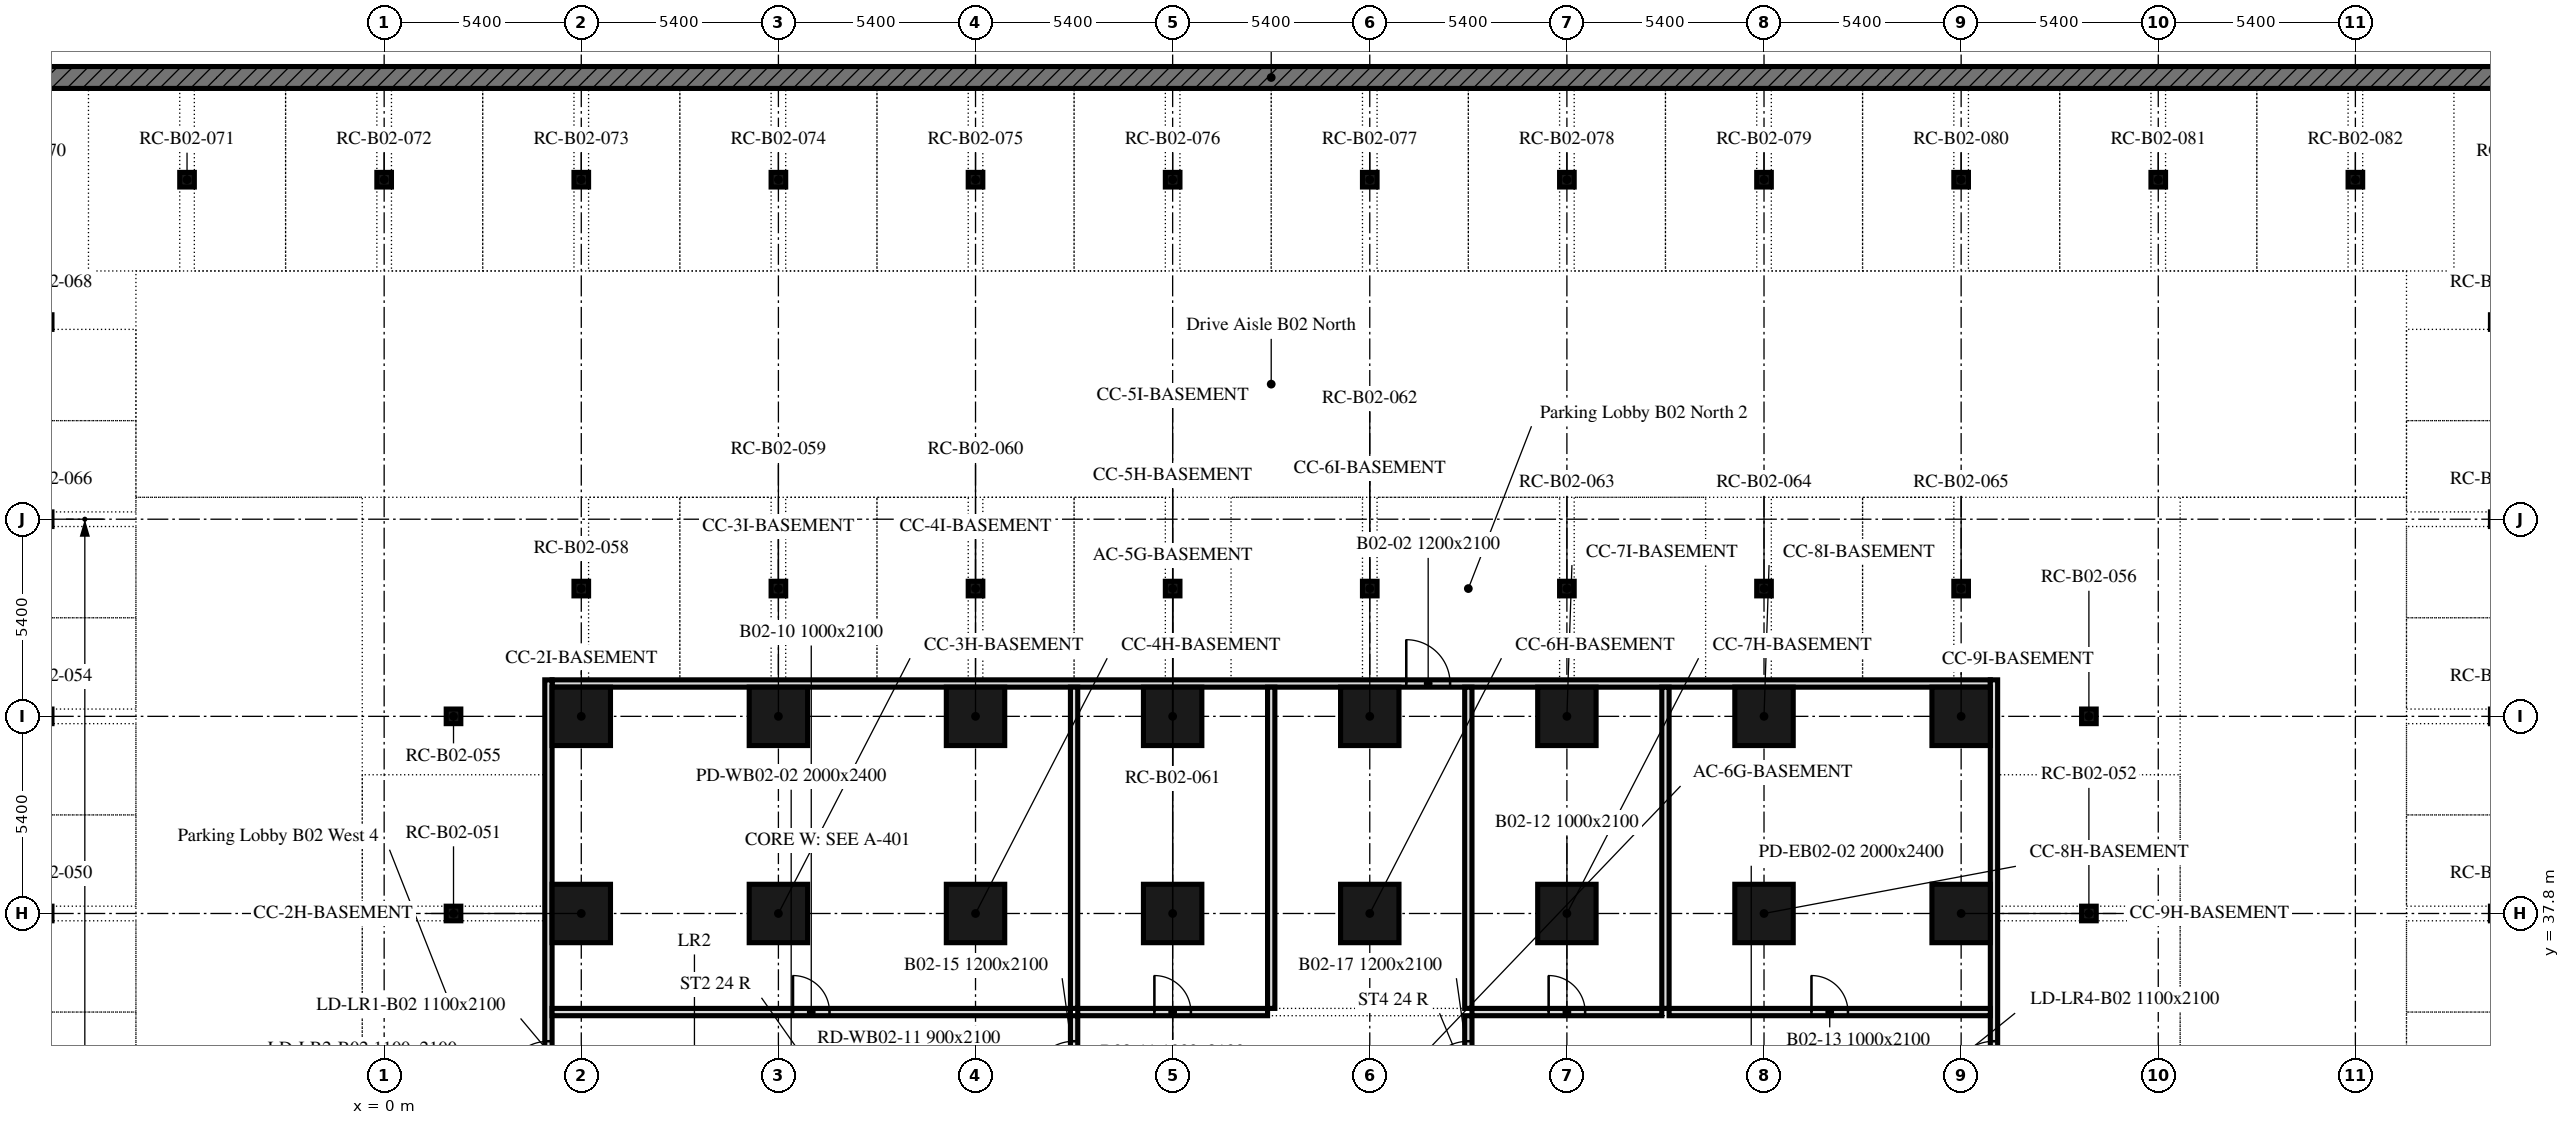
"""IFC4 building model, lengths in metres.
Left out: names, types, materials, properties, quantities, classifications, styles, units other than length and angle.
Written with IfcOpenShell. Run it as: python <this file> out.ifc"""

import sys

from ifc_helpers import new_model, si_unit, direction, frame, frame_2d, origin, origin_2d, place, context, subcontext, project, spatial, rectangle, extrude, element, fill, save


model = new_model("IFC4")
c1 = context("Model", 3, precision=1e-05, world=origin(), true_north=direction((0.0, 1.0)))
c2 = subcontext(c1, "Body", "Model", "MODEL_VIEW")
j1 = project(units=[si_unit("LENGTHUNIT", "METRE"), si_unit("PLANEANGLEUNIT", "RADIAN")], contexts=[c1])
p1 = place(None, origin())
s1 = spatial("IfcSite", under=j1, at=p1, CompositionType="ELEMENT")
p2 = place(p1, origin())
s2 = spatial("IfcBuilding", under=s1, at=p2, CompositionType="ELEMENT")
p3 = place(p2, frame((0.0, 0.0, -9.0)))
s3 = spatial("IfcBuildingStorey", under=s2, at=p3, CompositionType="ELEMENT", Elevation=-9.0)
p4 = place(p3, frame((-11.8, 60.7, 0.0), z_axis=(0.0, 0.0, 1.0), x_axis=(1.0, 0.0, 0.0)))
e1 = element("IfcWall", 1, at=p4, inside=s3, PredefinedType="SOLIDWALL", context=c2, shape_type="SweptSolid", body=[
    extrude(rectangle(XDim=72.2, YDim=0.6, at=frame_2d((36.1, 0.0))), origin(), (0.0, 0.0, 1.0), 4.1),
])
for number, where, z_axis, x_axis in (
    (2, (5.4, 37.8, 0.0), (0.0, 0.0, 1.0), (1.0, 0.0, 0.0)),
    (3, (10.8, 37.8, 0.0), (0.0, 0.0, 1.0), (1.0, 0.0, 0.0)),
    (4, (16.2, 37.8, 0.0), (0.0, 0.0, 1.0), (1.0, 0.0, 0.0)),
    (5, (21.6, 37.8, 0.0), (0.0, 0.0, 1.0), (1.0, 0.0, 0.0)),
    (6, (27.0, 37.8, 0.0), (0.0, 0.0, 1.0), (1.0, 0.0, 0.0)),
    (7, (32.4, 37.8, 0.0), (0.0, 0.0, 1.0), (1.0, 0.0, 0.0)),
    (8, (37.8, 37.8, 0.0), (0.0, 0.0, 1.0), (1.0, 0.0, 0.0)),
    (9, (43.2, 37.8, 0.0), (0.0, 0.0, 1.0), (1.0, 0.0, 0.0)),
    (10, (5.4, 43.2, 0.0), (0.0, 0.0, 1.0), (1.0, 0.0, 0.0)),
    (11, (10.8, 43.2, 0.0), (0.0, 0.0, 1.0), (1.0, 0.0, 0.0)),
    (12, (16.2, 43.2, 0.0), (0.0, 0.0, 1.0), (1.0, 0.0, 0.0)),
    (13, (21.6, 43.2, 0.0), (0.0, 0.0, 1.0), (1.0, 0.0, 0.0)),
    (14, (27.0, 43.2, 0.0), (0.0, 0.0, 1.0), (1.0, 0.0, 0.0)),
    (15, (32.4, 43.2, 0.0), (0.0, 0.0, 1.0), (1.0, 0.0, 0.0)),
    (16, (37.8, 43.2, 0.0), (0.0, 0.0, 1.0), (1.0, 0.0, 0.0)),
    (17, (43.2, 43.2, 0.0), (0.0, 0.0, 1.0), (1.0, 0.0, 0.0)),
):
    element("IfcColumn", number, at=place(p3, frame(where, z_axis=z_axis, x_axis=x_axis)), inside=s3, PredefinedType="COLUMN", context=c2, shape_type="SweptSolid", body=[
        extrude(rectangle(XDim=1.6, YDim=1.6, at=origin_2d()), origin(), (0.0, 0.0, 1.0), 4.1),
    ])
for number, where, z_axis, x_axis in (
    (18, (1.9, 37.8, 0.0), (0.0, 0.0, 1.0), (1.0, 0.0, 0.0)),
    (19, (46.7, 37.8, 0.0), (0.0, 0.0, 1.0), (1.0, 0.0, 0.0)),
    (20, (1.9, 43.2, 0.0), (0.0, 0.0, 1.0), (1.0, 0.0, 0.0)),
    (21, (46.7, 43.2, 0.0), (0.0, 0.0, 1.0), (1.0, 0.0, 0.0)),
    (22, (5.4, 46.7, 0.0), (0.0, 0.0, 1.0), (1.0, 0.0, 0.0)),
    (23, (10.8, 46.7, 0.0), (0.0, 0.0, 1.0), (1.0, 0.0, 0.0)),
    (24, (16.2, 46.7, 0.0), (0.0, 0.0, 1.0), (1.0, 0.0, 0.0)),
    (25, (21.6, 46.7, 0.0), (0.0, 0.0, 1.0), (1.0, 0.0, 0.0)),
    (26, (27.0, 46.7, 0.0), (0.0, 0.0, 1.0), (1.0, 0.0, 0.0)),
    (27, (32.4, 46.7, 0.0), (0.0, 0.0, 1.0), (1.0, 0.0, 0.0)),
    (28, (37.8, 46.7, 0.0), (0.0, 0.0, 1.0), (1.0, 0.0, 0.0)),
    (29, (43.2, 46.7, 0.0), (0.0, 0.0, 1.0), (1.0, 0.0, 0.0)),
    (30, (-5.4, 57.9, 0.0), (0.0, 0.0, 1.0), (1.0, 0.0, 0.0)),
    (31, (0.0, 57.9, 0.0), (0.0, 0.0, 1.0), (1.0, 0.0, 0.0)),
    (32, (5.4, 57.9, 0.0), (0.0, 0.0, 1.0), (1.0, 0.0, 0.0)),
    (33, (10.8, 57.9, 0.0), (0.0, 0.0, 1.0), (1.0, 0.0, 0.0)),
    (34, (16.2, 57.9, 0.0), (0.0, 0.0, 1.0), (1.0, 0.0, 0.0)),
    (35, (21.6, 57.9, 0.0), (0.0, 0.0, 1.0), (1.0, 0.0, 0.0)),
    (36, (27.0, 57.9, 0.0), (0.0, 0.0, 1.0), (1.0, 0.0, 0.0)),
    (37, (32.4, 57.9, 0.0), (0.0, 0.0, 1.0), (1.0, 0.0, 0.0)),
    (38, (37.8, 57.9, 0.0), (0.0, 0.0, 1.0), (1.0, 0.0, 0.0)),
    (39, (43.2, 57.9, 0.0), (0.0, 0.0, 1.0), (1.0, 0.0, 0.0)),
    (40, (48.6, 57.9, 0.0), (0.0, 0.0, 1.0), (1.0, 0.0, 0.0)),
    (41, (54.0, 57.9, 0.0), (0.0, 0.0, 1.0), (1.0, 0.0, 0.0)),
):
    element("IfcColumn", number, at=place(p3, frame(where, z_axis=z_axis, x_axis=x_axis)), inside=s3, PredefinedType="COLUMN", context=c2, shape_type="SweptSolid", body=[
        extrude(rectangle(XDim=0.4, YDim=0.4, at=origin_2d()), origin(), (0.0, 0.0, 1.0), 4.1),
    ])
p5 = place(p3, frame((4.6, 44.1, 0.0), z_axis=(0.0, 0.0, 1.0), x_axis=(1.0, 0.0, 0.0)))
e42 = element("IfcWall", 42, at=p5, inside=s3, PredefinedType="PARTITIONING", context=c2, shape_type="SweptSolid", body=[
    extrude(rectangle(XDim=39.4, YDim=0.2, at=frame_2d((19.7, 0.0))), origin(), (0.0, 0.0, 1.0), 4.1),
])
p6 = place(p5, frame((23.4, 0.0, 0.0)))
e43 = element("IfcOpeningElement", 43, at=p6, cuts=e42, PredefinedType="OPENING", context=c2, shape_type="SweptSolid", body=[
    extrude(rectangle(XDim=1.2, YDim=2.1, at=frame_2d((0.6, 1.05))), frame((0.0, 0.11, 0.0), z_axis=(0.0, -1.0, 0.0), x_axis=(1.0, 0.0, 0.0)), (0.0, 0.0, 1.0), 0.22),
])
p7 = place(p3, frame((4.5, 4.4, 0.0), z_axis=(0.0, 0.0, 1.0), x_axis=(0.0, 1.0, 0.0)))
e44 = element("IfcWall", 44, at=p7, inside=s3, PredefinedType="PARTITIONING", context=c2, shape_type="SweptSolid", body=[
    extrude(rectangle(XDim=39.8, YDim=0.2, at=frame_2d((19.9, 0.0))), origin(), (0.0, 0.0, 1.0), 4.1),
])
p8 = place(p7, frame((9.9, 0.0, 0.0)))
e45 = element("IfcOpeningElement", 45, at=p8, cuts=e44, PredefinedType="OPENING", context=c2, shape_type="SweptSolid", body=[
    extrude(rectangle(XDim=1.2, YDim=2.1, at=frame_2d((0.6, 1.05))), frame((0.0, 0.11, 0.0), z_axis=(0.0, -1.0, 0.0), x_axis=(1.0, 0.0, 0.0)), (0.0, 0.0, 1.0), 0.22),
])
p9 = place(p7, frame((28.7, 0.0, 0.0)))
e46 = element("IfcOpeningElement", 46, at=p9, cuts=e44, PredefinedType="OPENING", context=c2, shape_type="SweptSolid", body=[
    extrude(rectangle(XDim=1.2, YDim=2.1, at=frame_2d((0.6, 1.05))), frame((0.0, 0.11, 0.0), z_axis=(0.0, -1.0, 0.0), x_axis=(1.0, 0.0, 0.0)), (0.0, 0.0, 1.0), 0.22),
])
p10 = place(p3, frame((44.1, 4.4, 0.0), z_axis=(0.0, 0.0, 1.0), x_axis=(0.0, 1.0, 0.0)))
e47 = element("IfcWall", 47, at=p10, inside=s3, PredefinedType="PARTITIONING", context=c2, shape_type="SweptSolid", body=[
    extrude(rectangle(XDim=39.8, YDim=0.2, at=frame_2d((19.9, 0.0))), origin(), (0.0, 0.0, 1.0), 4.1),
])
p11 = place(p10, frame((9.9, 0.0, 0.0)))
e48 = element("IfcOpeningElement", 48, at=p11, cuts=e47, PredefinedType="OPENING", context=c2, shape_type="SweptSolid", body=[
    extrude(rectangle(XDim=1.2, YDim=2.1, at=frame_2d((0.6, 1.05))), frame((0.0, 0.11, 0.0), z_axis=(0.0, -1.0, 0.0), x_axis=(1.0, 0.0, 0.0)), (0.0, 0.0, 1.0), 0.22),
])
p12 = place(p10, frame((28.7, 0.0, 0.0)))
e49 = element("IfcOpeningElement", 49, at=p12, cuts=e47, PredefinedType="OPENING", context=c2, shape_type="SweptSolid", body=[
    extrude(rectangle(XDim=1.2, YDim=2.1, at=frame_2d((0.6, 1.05))), frame((0.0, 0.11, 0.0), z_axis=(0.0, -1.0, 0.0), x_axis=(1.0, 0.0, 0.0)), (0.0, 0.0, 1.0), 0.22),
])
for number, where, z_axis, x_axis in (
    (50, (18.9, 35.2, 0.0), (0.0, 0.0, 1.0), (0.0, 1.0, 0.0)),
    (51, (24.3, 35.2, 0.0), (0.0, 0.0, 1.0), (0.0, 1.0, 0.0)),
    (52, (29.7, 35.2, 0.0), (0.0, 0.0, 1.0), (0.0, 1.0, 0.0)),
    (53, (35.1, 35.2, 0.0), (0.0, 0.0, 1.0), (0.0, 1.0, 0.0)),
):
    element("IfcWall", number, at=place(p3, frame(where, z_axis=z_axis, x_axis=x_axis)), inside=s3, PredefinedType="PARTITIONING", context=c2, shape_type="SweptSolid", body=[
        extrude(rectangle(XDim=8.8, YDim=0.2, at=frame_2d((4.4, 0.0))), origin(), (0.0, 0.0, 1.0), 4.1),
    ])
p13 = place(p3, frame((4.6, 35.1, 0.0), z_axis=(0.0, 0.0, 1.0), x_axis=(1.0, 0.0, 0.0)))
e54 = element("IfcWall", 54, at=p13, inside=s3, PredefinedType="PARTITIONING", context=c2, shape_type="SweptSolid", body=[
    extrude(rectangle(XDim=14.2, YDim=0.2, at=frame_2d((7.1, 0.0))), origin(), (0.0, 0.0, 1.0), 4.1),
])
p14 = place(p13, frame((6.6, 0.0, 0.0)))
e55 = element("IfcOpeningElement", 55, at=p14, cuts=e54, PredefinedType="OPENING", context=c2, shape_type="SweptSolid", body=[
    extrude(rectangle(XDim=1.0, YDim=2.1, at=frame_2d((0.5, 1.05))), frame((0.0, 0.11, 0.0), z_axis=(0.0, -1.0, 0.0), x_axis=(1.0, 0.0, 0.0)), (0.0, 0.0, 1.0), 0.22),
])
p15 = place(p3, frame((19.0, 35.1, 0.0), z_axis=(0.0, 0.0, 1.0), x_axis=(1.0, 0.0, 0.0)))
e56 = element("IfcWall", 56, at=p15, inside=s3, PredefinedType="PARTITIONING", context=c2, shape_type="SweptSolid", body=[
    extrude(rectangle(XDim=5.2, YDim=0.2, at=frame_2d((2.6, 0.0))), origin(), (0.0, 0.0, 1.0), 4.1),
])
p16 = place(p15, frame((2.1, 0.0, 0.0)))
e57 = element("IfcOpeningElement", 57, at=p16, cuts=e56, PredefinedType="OPENING", context=c2, shape_type="SweptSolid", body=[
    extrude(rectangle(XDim=1.0, YDim=2.1, at=frame_2d((0.5, 1.05))), frame((0.0, 0.11, 0.0), z_axis=(0.0, -1.0, 0.0), x_axis=(1.0, 0.0, 0.0)), (0.0, 0.0, 1.0), 0.22),
])
p17 = place(p3, frame((29.8, 35.1, 0.0), z_axis=(0.0, 0.0, 1.0), x_axis=(1.0, 0.0, 0.0)))
e58 = element("IfcWall", 58, at=p17, inside=s3, PredefinedType="PARTITIONING", context=c2, shape_type="SweptSolid", body=[
    extrude(rectangle(XDim=5.2, YDim=0.2, at=frame_2d((2.6, 0.0))), origin(), (0.0, 0.0, 1.0), 4.1),
])
p18 = place(p17, frame((2.1, 0.0, 0.0)))
e59 = element("IfcOpeningElement", 59, at=p18, cuts=e58, PredefinedType="OPENING", context=c2, shape_type="SweptSolid", body=[
    extrude(rectangle(XDim=1.0, YDim=2.1, at=frame_2d((0.5, 1.05))), frame((0.0, 0.11, 0.0), z_axis=(0.0, -1.0, 0.0), x_axis=(1.0, 0.0, 0.0)), (0.0, 0.0, 1.0), 0.22),
])
p19 = place(p3, frame((35.2, 35.1, 0.0), z_axis=(0.0, 0.0, 1.0), x_axis=(1.0, 0.0, 0.0)))
e60 = element("IfcWall", 60, at=p19, inside=s3, PredefinedType="PARTITIONING", context=c2, shape_type="SweptSolid", body=[
    extrude(rectangle(XDim=8.8, YDim=0.2, at=frame_2d((4.4, 0.0))), origin(), (0.0, 0.0, 1.0), 4.1),
])
p20 = place(p19, frame((3.9, 0.0, 0.0)))
e61 = element("IfcOpeningElement", 61, at=p20, cuts=e60, PredefinedType="OPENING", context=c2, shape_type="SweptSolid", body=[
    extrude(rectangle(XDim=1.0, YDim=2.1, at=frame_2d((0.5, 1.05))), frame((0.0, 0.11, 0.0), z_axis=(0.0, -1.0, 0.0), x_axis=(1.0, 0.0, 0.0)), (0.0, 0.0, 1.0), 0.22),
])
p21 = place(p3, frame((18.9, 32.4, 0.0), z_axis=(0.0, 0.0, 1.0), x_axis=(0.0, 1.0, 0.0)))
e62 = element("IfcWall", 62, at=p21, inside=s3, PredefinedType="PARTITIONING", context=c2, shape_type="SweptSolid", body=[
    extrude(rectangle(XDim=2.6, YDim=0.2, at=frame_2d((1.3, 0.0))), origin(), (0.0, 0.0, 1.0), 4.1),
])
p22 = place(p21, frame((0.7, 0.0, 0.0)))
e63 = element("IfcOpeningElement", 63, at=p22, cuts=e62, PredefinedType="OPENING", context=c2, shape_type="SweptSolid", body=[
    extrude(rectangle(XDim=1.2, YDim=2.1, at=frame_2d((0.6, 1.05))), frame((0.0, 0.11, 0.0), z_axis=(0.0, -1.0, 0.0), x_axis=(1.0, 0.0, 0.0)), (0.0, 0.0, 1.0), 0.22),
])
p23 = place(p3, frame((29.7, 32.4, 0.0), z_axis=(0.0, 0.0, 1.0), x_axis=(0.0, 1.0, 0.0)))
e64 = element("IfcWall", 64, at=p23, inside=s3, PredefinedType="PARTITIONING", context=c2, shape_type="SweptSolid", body=[
    extrude(rectangle(XDim=2.6, YDim=0.2, at=frame_2d((1.3, 0.0))), origin(), (0.0, 0.0, 1.0), 4.1),
])
p24 = place(p23, frame((0.7, 0.0, 0.0)))
e65 = element("IfcOpeningElement", 65, at=p24, cuts=e64, PredefinedType="OPENING", context=c2, shape_type="SweptSolid", body=[
    extrude(rectangle(XDim=1.2, YDim=2.1, at=frame_2d((0.6, 1.05))), frame((0.0, 0.11, 0.0), z_axis=(0.0, -1.0, 0.0), x_axis=(1.0, 0.0, 0.0)), (0.0, 0.0, 1.0), 0.22),
])
p25 = place(p6, origin())
e66 = element("IfcDoor", 66, at=p25, inside=s3, OperationType="SINGLE_SWING_LEFT", PredefinedType="DOOR", context=c2, shape_type="SweptSolid", body=[
    extrude(rectangle(XDim=1.2, YDim=2.1, at=frame_2d((0.6, 1.05))), frame((0.0, 0.025, 0.0), z_axis=(0.0, -1.0, 0.0), x_axis=(1.0, 0.0, 0.0)), (0.0, 0.0, 1.0), 0.05),
])
fill(e43, e66)
p26 = place(p9, origin())
e67 = element("IfcDoor", 67, at=p26, inside=s3, OperationType="SINGLE_SWING_LEFT", PredefinedType="DOOR", context=c2, shape_type="SweptSolid", body=[
    extrude(rectangle(XDim=1.2, YDim=2.1, at=frame_2d((0.6, 1.05))), frame((0.0, 0.025, 0.0), z_axis=(0.0, -1.0, 0.0), x_axis=(1.0, 0.0, 0.0)), (0.0, 0.0, 1.0), 0.05),
])
fill(e46, e67)
p27 = place(p12, origin())
e68 = element("IfcDoor", 68, at=p27, inside=s3, OperationType="SINGLE_SWING_LEFT", PredefinedType="DOOR", context=c2, shape_type="SweptSolid", body=[
    extrude(rectangle(XDim=1.2, YDim=2.1, at=frame_2d((0.6, 1.05))), frame((0.0, 0.025, 0.0), z_axis=(0.0, -1.0, 0.0), x_axis=(1.0, 0.0, 0.0)), (0.0, 0.0, 1.0), 0.05),
])
fill(e49, e68)
p28 = place(p14, origin())
e69 = element("IfcDoor", 69, at=p28, inside=s3, OperationType="SINGLE_SWING_LEFT", PredefinedType="DOOR", context=c2, shape_type="SweptSolid", body=[
    extrude(rectangle(XDim=1.0, YDim=2.1, at=frame_2d((0.5, 1.05))), frame((0.0, 0.025, 0.0), z_axis=(0.0, -1.0, 0.0), x_axis=(1.0, 0.0, 0.0)), (0.0, 0.0, 1.0), 0.05),
])
fill(e55, e69)
p29 = place(p16, origin())
e70 = element("IfcDoor", 70, at=p29, inside=s3, OperationType="SINGLE_SWING_LEFT", PredefinedType="DOOR", context=c2, shape_type="SweptSolid", body=[
    extrude(rectangle(XDim=1.0, YDim=2.1, at=frame_2d((0.5, 1.05))), frame((0.0, 0.025, 0.0), z_axis=(0.0, -1.0, 0.0), x_axis=(1.0, 0.0, 0.0)), (0.0, 0.0, 1.0), 0.05),
])
fill(e57, e70)
p30 = place(p18, origin())
e71 = element("IfcDoor", 71, at=p30, inside=s3, OperationType="SINGLE_SWING_LEFT", PredefinedType="DOOR", context=c2, shape_type="SweptSolid", body=[
    extrude(rectangle(XDim=1.0, YDim=2.1, at=frame_2d((0.5, 1.05))), frame((0.0, 0.025, 0.0), z_axis=(0.0, -1.0, 0.0), x_axis=(1.0, 0.0, 0.0)), (0.0, 0.0, 1.0), 0.05),
])
fill(e59, e71)
p31 = place(p20, origin())
e72 = element("IfcDoor", 72, at=p31, inside=s3, OperationType="SINGLE_SWING_LEFT", PredefinedType="DOOR", context=c2, shape_type="SweptSolid", body=[
    extrude(rectangle(XDim=1.0, YDim=2.1, at=frame_2d((0.5, 1.05))), frame((0.0, 0.025, 0.0), z_axis=(0.0, -1.0, 0.0), x_axis=(1.0, 0.0, 0.0)), (0.0, 0.0, 1.0), 0.05),
])
fill(e61, e72)
p32 = place(p22, origin())
e73 = element("IfcDoor", 73, at=p32, inside=s3, OperationType="SINGLE_SWING_LEFT", PredefinedType="DOOR", context=c2, shape_type="SweptSolid", body=[
    extrude(rectangle(XDim=1.2, YDim=2.1, at=frame_2d((0.6, 1.05))), frame((0.0, 0.025, 0.0), z_axis=(0.0, -1.0, 0.0), x_axis=(1.0, 0.0, 0.0)), (0.0, 0.0, 1.0), 0.05),
])
fill(e63, e73)
p33 = place(p24, origin())
e74 = element("IfcDoor", 74, at=p33, inside=s3, OperationType="SINGLE_SWING_LEFT", PredefinedType="DOOR", context=c2, shape_type="SweptSolid", body=[
    extrude(rectangle(XDim=1.2, YDim=2.1, at=frame_2d((0.6, 1.05))), frame((0.0, 0.025, 0.0), z_axis=(0.0, -1.0, 0.0), x_axis=(1.0, 0.0, 0.0)), (0.0, 0.0, 1.0), 0.05),
])
fill(e65, e74)
save(model, sys.argv[1])
